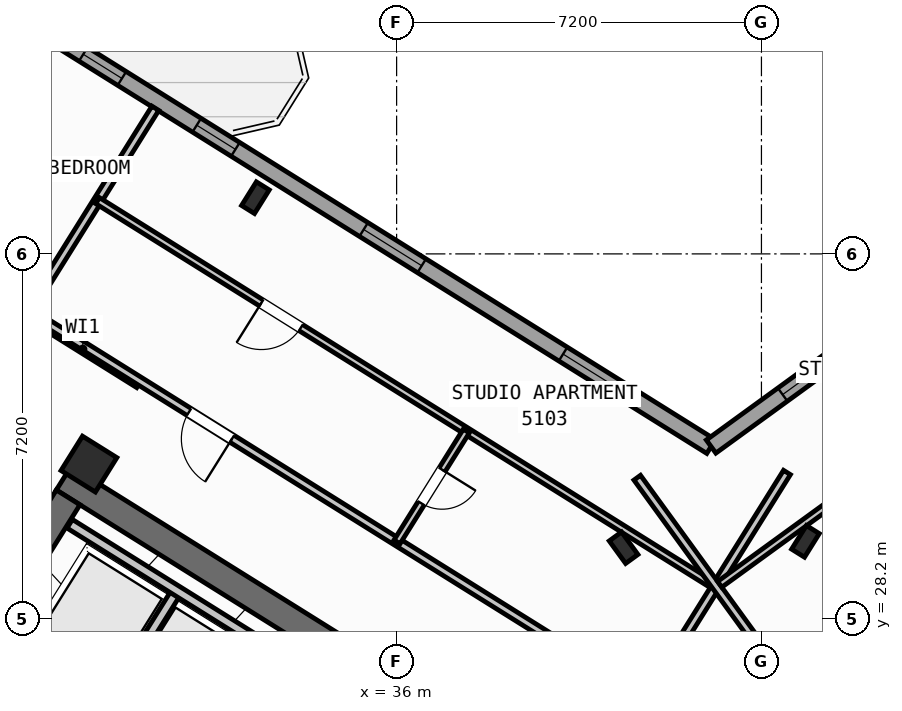
"""IFC4 building model, lengths in metres.
Left out: names, types, materials, properties, quantities, classifications, styles, units other than length and angle.
Written with IfcOpenShell. Run it as: python <this file> out.ifc"""

import sys

from ifc_helpers import new_model, si_unit, direction, frame, frame_2d, origin, origin_2d, place, context, subcontext, project, spatial, rectangle, hollow_rectangle, i_section, extrude, source, transform, mapped, element, fill, save


model = new_model("IFC4")
c1 = context("Model", 3, precision=1e-05, world=origin(), true_north=direction((0.0, 1.0)))
c2 = subcontext(c1, "Body", "Model", "MODEL_VIEW")
j1 = project(units=[si_unit("LENGTHUNIT", "METRE"), si_unit("PLANEANGLEUNIT", "RADIAN")], contexts=[c1])
p1 = place(None, origin())
s1 = spatial("IfcSite", under=j1, at=p1, CompositionType="ELEMENT")
p2 = place(p1, origin())
s2 = spatial("IfcBuilding", under=s1, at=p2, CompositionType="ELEMENT")
p3 = place(p2, frame((0.0, 0.0, 204.0)))
s3 = spatial("IfcBuildingStorey", under=s2, at=p3, CompositionType="ELEMENT", Elevation=204.0)
p4 = place(p3, frame((40.573, 24.01, 0.0), z_axis=(0.0, 0.0, 1.0), x_axis=(-0.848047359947, 0.529920442413, 0.0)))
e1 = element("IfcWall", 1, at=p4, inside=s3, PredefinedType="SHEAR", context=c2, shape_type="SweptSolid", body=[
    extrude(rectangle(XDim=13.14, YDim=0.55, at=frame_2d((6.57, 0.0))), origin(), (0.0, 0.0, 1.0), 3.35),
])
p5 = place(p3, frame((29.517, 30.594, 0.0), z_axis=(0.0, 0.0, 1.0), x_axis=(-0.529906864564, -0.848055844204, 0.0)))
e2 = element("IfcWall", 2, at=p5, inside=s3, PredefinedType="SHEAR", context=c2, shape_type="SweptSolid", body=[
    extrude(rectangle(XDim=3.575, YDim=0.55, at=frame_2d((1.788, 0.0))), origin(), (0.0, 0.0, 1.0), 3.35),
])
p6 = place(p3, frame((44.365, 24.142, 0.0), z_axis=(0.0, 0.0, 1.0), x_axis=(0.809024304885, 0.587775190107, 0.0)))
e3 = element("IfcWall", 3, at=p6, inside=s3, PredefinedType="SHEAR", context=c2, shape_type="SweptSolid", body=[
    extrude(rectangle(XDim=12.34, YDim=0.55, at=frame_2d((6.17, 0.0))), origin(), (0.0, 0.0, 1.0), 3.35),
])
m1 = source(origin(), c2, "Body", "SweptSolid", [
    extrude(i_section(OverallWidth=0.3, OverallDepth=0.55, WebThickness=0.015, FlangeThickness=0.029, at=origin_2d()), origin(), (0.0, 0.0, 1.0), 3.6),
])
for number, where, z_axis, x_axis in (
    (4, (44.068, 29.726, 0.0), (0.0, 0.0, 1.0), (-0.848, 0.53, 0.0)),
    (5, (33.213, 36.509, 0.0), (0.0, 0.0, 1.0), (-0.848, 0.53, 0.0)),
):
    element("IfcColumn", number, at=place(p3, frame(where, z_axis=z_axis, x_axis=x_axis)), inside=s3, PredefinedType="COLUMN", context=c2, shape_type="MappedRepresentation", body=[
        mapped(m1, transform((0.0, 0.0, 0.0), scale=1.0)),
    ])
m2 = source(origin(), c2, "Body", "SweptSolid", [
    extrude(hollow_rectangle(XDim=0.8, YDim=0.8, WallThickness=0.032, at=origin_2d()), origin(), (0.0, 0.0, 1.0), 3.6),
])
p7 = place(p3, frame((29.928, 31.251, 0.0), z_axis=(0.0, 0.0, 1.0), x_axis=(-0.848048096156, 0.529919264233, 0.0)))
e6 = element("IfcColumn", 6, at=p7, inside=s3, PredefinedType="COLUMN", context=c2, shape_type="MappedRepresentation", body=[
    mapped(m2, transform((0.0, 0.0, 0.0), scale=1.0)),
])
p8 = place(p3, frame((40.479, 29.601, 0.0), z_axis=(0.0, 0.0, 1.0), x_axis=(0.809016994375, 0.587785252292, 0.0)))
e7 = element("IfcColumn", 7, at=p8, inside=s3, PredefinedType="COLUMN", context=c2, shape_type="MappedRepresentation", body=[
    mapped(m1, transform((0.0, 0.0, 0.0), scale=1.0)),
])
p9 = place(p3, frame((31.76, 12.183, 0.0), z_axis=(0.0, 0.0, 1.0), x_axis=(-0.848047074256, 0.529920899612, 0.0)))
e8 = element("IfcWall", 8, at=p9, inside=s3, PredefinedType="STANDARD", context=c2, shape_type="SweptSolid", body=[
    extrude(rectangle(XDim=30.652, YDim=0.32, at=frame_2d((15.326, 0.0))), origin(), (0.0, 0.0, 1.0), 3.35),
])
p10 = place(p9, frame((15.166, 0.0, 0.0)))
e9 = element("IfcOpeningElement", 9, at=p10, cuts=e8, PredefinedType="OPENING", context=c2, shape_type="SweptSolid", body=[
    extrude(rectangle(XDim=1.2, YDim=2.15, at=frame_2d((0.6, 1.075))), frame((0.0, 0.17, 0.0), z_axis=(0.0, -1.0, 0.0), x_axis=(1.0, 0.0, 0.0)), (0.0, 0.0, 1.0), 0.34),
])
p11 = place(p9, frame((2.24, 0.0, 0.9)))
e10 = element("IfcOpeningElement", 10, at=p11, cuts=e8, PredefinedType="OPENING", context=c2, shape_type="SweptSolid", body=[
    extrude(rectangle(XDim=1.65, YDim=1.45, at=frame_2d((0.825, 0.725))), frame((0.0, 0.17, 0.0), z_axis=(0.0, -1.0, 0.0), x_axis=(1.0, 0.0, 0.0)), (0.0, 0.0, 1.0), 0.34),
])
p12 = place(p9, frame((7.469, 0.0, 0.9)))
e11 = element("IfcOpeningElement", 11, at=p12, cuts=e8, PredefinedType="OPENING", context=c2, shape_type="SweptSolid", body=[
    extrude(rectangle(XDim=1.65, YDim=1.45, at=frame_2d((0.825, 0.725))), frame((0.0, 0.17, 0.0), z_axis=(0.0, -1.0, 0.0), x_axis=(1.0, 0.0, 0.0)), (0.0, 0.0, 1.0), 0.34),
])
p13 = place(p9, frame((12.623, 0.0, 1.0)))
e12 = element("IfcOpeningElement", 12, at=p13, cuts=e8, PredefinedType="OPENING", context=c2, shape_type="SweptSolid", body=[
    extrude(rectangle(XDim=0.9, YDim=1.25, at=frame_2d((0.45, 0.625))), frame((0.0, 0.17, 0.0), z_axis=(0.0, -1.0, 0.0), x_axis=(1.0, 0.0, 0.0)), (0.0, 0.0, 1.0), 0.34),
])
p14 = place(p9, frame((19.556, 0.0, 1.0)))
e13 = element("IfcOpeningElement", 13, at=p14, cuts=e8, PredefinedType="OPENING", context=c2, shape_type="SweptSolid", body=[
    extrude(rectangle(XDim=0.9, YDim=1.25, at=frame_2d((0.45, 0.625))), frame((0.0, 0.17, 0.0), z_axis=(0.0, -1.0, 0.0), x_axis=(1.0, 0.0, 0.0)), (0.0, 0.0, 1.0), 0.34),
])
p15 = place(p9, frame((21.95, 0.0, 1.0)))
e14 = element("IfcOpeningElement", 14, at=p15, cuts=e8, PredefinedType="OPENING", context=c2, shape_type="SweptSolid", body=[
    extrude(rectangle(XDim=0.9, YDim=1.25, at=frame_2d((0.45, 0.625))), frame((0.0, 0.17, 0.0), z_axis=(0.0, -1.0, 0.0), x_axis=(1.0, 0.0, 0.0)), (0.0, 0.0, 1.0), 0.34),
])
p16 = place(p9, frame((26.983, 0.0, 0.9)))
e15 = element("IfcOpeningElement", 15, at=p16, cuts=e8, PredefinedType="OPENING", context=c2, shape_type="SweptSolid", body=[
    extrude(rectangle(XDim=1.35, YDim=1.45, at=frame_2d((0.675, 0.725))), frame((0.0, 0.17, 0.0), z_axis=(0.0, -1.0, 0.0), x_axis=(1.0, 0.0, 0.0)), (0.0, 0.0, 1.0), 0.34),
])
p17 = place(p3, frame((17.424, 47.083, 0.0), z_axis=(0.0, 0.0, 1.0), x_axis=(0.848049927979, -0.529916332693, 0.0)))
e16 = element("IfcWall", 16, at=p17, inside=s3, PredefinedType="STANDARD", context=c2, shape_type="SweptSolid", body=[
    extrude(rectangle(XDim=29.223, YDim=0.32, at=frame_2d((14.612, 0.0))), origin(), (0.0, 0.0, 1.0), 3.35),
])
p18 = place(p17, frame((8.799, 0.0, 0.0)))
e17 = element("IfcOpeningElement", 17, at=p18, cuts=e16, PredefinedType="OPENING", context=c2, shape_type="SweptSolid", body=[
    extrude(rectangle(XDim=1.05, YDim=2.15, at=frame_2d((0.525, 1.075))), frame((0.0, 0.17, 0.0), z_axis=(0.0, -1.0, 0.0), x_axis=(1.0, 0.0, 0.0)), (0.0, 0.0, 1.0), 0.34),
])
p19 = place(p17, frame((0.794, 0.0, 0.9)))
e18 = element("IfcOpeningElement", 18, at=p19, cuts=e16, PredefinedType="OPENING", context=c2, shape_type="SweptSolid", body=[
    extrude(rectangle(XDim=1.65, YDim=1.45, at=frame_2d((0.825, 0.725))), frame((0.0, 0.17, 0.0), z_axis=(0.0, -1.0, 0.0), x_axis=(1.0, 0.0, 0.0)), (0.0, 0.0, 1.0), 0.34),
])
p20 = place(p17, frame((4.056, 0.0, 0.9)))
e19 = element("IfcOpeningElement", 19, at=p20, cuts=e16, PredefinedType="OPENING", context=c2, shape_type="SweptSolid", body=[
    extrude(rectangle(XDim=1.35, YDim=1.45, at=frame_2d((0.675, 0.725))), frame((0.0, 0.17, 0.0), z_axis=(0.0, -1.0, 0.0), x_axis=(1.0, 0.0, 0.0)), (0.0, 0.0, 1.0), 0.34),
])
p21 = place(p17, frame((7.151, 0.0, 1.0)))
e20 = element("IfcOpeningElement", 20, at=p21, cuts=e16, PredefinedType="OPENING", context=c2, shape_type="SweptSolid", body=[
    extrude(rectangle(XDim=0.9, YDim=1.25, at=frame_2d((0.45, 0.625))), frame((0.0, 0.17, 0.0), z_axis=(0.0, -1.0, 0.0), x_axis=(1.0, 0.0, 0.0)), (0.0, 0.0, 1.0), 0.34),
])
p22 = place(p17, frame((14.612, 0.0, 1.0)))
e21 = element("IfcOpeningElement", 21, at=p22, cuts=e16, PredefinedType="OPENING", context=c2, shape_type="SweptSolid", body=[
    extrude(rectangle(XDim=0.9, YDim=1.25, at=frame_2d((0.45, 0.625))), frame((0.0, 0.17, 0.0), z_axis=(0.0, -1.0, 0.0), x_axis=(1.0, 0.0, 0.0)), (0.0, 0.0, 1.0), 0.34),
])
p23 = place(p17, frame((17.254, 0.0, 1.0)))
e22 = element("IfcOpeningElement", 22, at=p23, cuts=e16, PredefinedType="OPENING", context=c2, shape_type="SweptSolid", body=[
    extrude(rectangle(XDim=0.9, YDim=1.25, at=frame_2d((0.45, 0.625))), frame((0.0, 0.17, 0.0), z_axis=(0.0, -1.0, 0.0), x_axis=(1.0, 0.0, 0.0)), (0.0, 0.0, 1.0), 0.34),
])
p24 = place(p17, frame((21.139, 0.0, 0.9)))
e23 = element("IfcOpeningElement", 23, at=p24, cuts=e16, PredefinedType="OPENING", context=c2, shape_type="SweptSolid", body=[
    extrude(rectangle(XDim=1.35, YDim=1.45, at=frame_2d((0.675, 0.725))), frame((0.0, 0.17, 0.0), z_axis=(0.0, -1.0, 0.0), x_axis=(1.0, 0.0, 0.0)), (0.0, 0.0, 1.0), 0.34),
])
p25 = place(p17, frame((25.778, 0.0, 0.9)))
e24 = element("IfcOpeningElement", 24, at=p25, cuts=e16, PredefinedType="OPENING", context=c2, shape_type="SweptSolid", body=[
    extrude(rectangle(XDim=1.35, YDim=1.45, at=frame_2d((0.675, 0.725))), frame((0.0, 0.17, 0.0), z_axis=(0.0, -1.0, 0.0), x_axis=(1.0, 0.0, 0.0)), (0.0, 0.0, 1.0), 0.34),
])
p26 = place(p3, frame((42.207, 31.597, 0.0), z_axis=(0.0, 0.0, 1.0), x_axis=(0.809020333377, 0.587780656523, 0.0)))
e25 = element("IfcWall", 25, at=p26, inside=s3, PredefinedType="STANDARD", context=c2, shape_type="SweptSolid", body=[
    extrude(rectangle(XDim=15.223, YDim=0.32, at=frame_2d((7.611, 0.0))), origin(), (0.0, 0.0, 1.0), 3.35),
])
p27 = place(p26, frame((12.82, 0.0, 0.0)))
e26 = element("IfcOpeningElement", 26, at=p27, cuts=e25, PredefinedType="OPENING", context=c2, shape_type="SweptSolid", body=[
    extrude(rectangle(XDim=1.05, YDim=2.15, at=frame_2d((0.525, 1.075))), frame((0.0, 0.17, 0.0), z_axis=(0.0, -1.0, 0.0), x_axis=(1.0, 0.0, 0.0)), (0.0, 0.0, 1.0), 0.34),
])
p28 = place(p26, frame((1.745, 0.0, 0.9)))
e27 = element("IfcOpeningElement", 27, at=p28, cuts=e25, PredefinedType="OPENING", context=c2, shape_type="SweptSolid", body=[
    extrude(rectangle(XDim=1.65, YDim=1.45, at=frame_2d((0.825, 0.725))), frame((0.0, 0.17, 0.0), z_axis=(0.0, -1.0, 0.0), x_axis=(1.0, 0.0, 0.0)), (0.0, 0.0, 1.0), 0.34),
])
p29 = place(p26, frame((5.985, 0.0, 0.9)))
e28 = element("IfcOpeningElement", 28, at=p29, cuts=e25, PredefinedType="OPENING", context=c2, shape_type="SweptSolid", body=[
    extrude(rectangle(XDim=1.65, YDim=1.45, at=frame_2d((0.825, 0.725))), frame((0.0, 0.17, 0.0), z_axis=(0.0, -1.0, 0.0), x_axis=(1.0, 0.0, 0.0)), (0.0, 0.0, 1.0), 0.34),
])
p30 = place(p26, frame((10.219, 0.0, 1.0)))
e29 = element("IfcOpeningElement", 29, at=p30, cuts=e25, PredefinedType="OPENING", context=c2, shape_type="SweptSolid", body=[
    extrude(rectangle(XDim=0.9, YDim=1.25, at=frame_2d((0.45, 0.625))), frame((0.0, 0.17, 0.0), z_axis=(0.0, -1.0, 0.0), x_axis=(1.0, 0.0, 0.0)), (0.0, 0.0, 1.0), 0.34),
])
p31 = place(p3, frame((31.645, 28.716, 0.0), z_axis=(0.0, 0.0, 1.0), x_axis=(-0.52986693015, -0.848080795876, 0.0)))
e30 = element("IfcWall", 30, at=p31, inside=s3, PredefinedType="STANDARD", context=c2, shape_type="SweptSolid", body=[
    extrude(rectangle(XDim=2.66, YDim=0.2, at=frame_2d((1.33, 0.0))), origin(), (0.0, 0.0, 1.0), 3.34),
])
p32 = place(p3, frame((33.363, 27.69, 0.0), z_axis=(0.0, 0.0, 1.0), x_axis=(-0.848047090064, 0.529920874315, 0.0)))
e31 = element("IfcWall", 31, at=p32, inside=s3, PredefinedType="STANDARD", context=c2, shape_type="SweptSolid", body=[
    extrude(rectangle(XDim=4.498, YDim=0.2, at=frame_2d((2.249, 0.0))), origin(), (0.0, 0.0, 1.0), 3.34),
])
p33 = place(p3, frame((30.914, 32.829, 0.0), z_axis=(0.0, 0.0, 1.0), x_axis=(-0.848008813643, 0.529982124211, 0.0)))
e32 = element("IfcWall", 32, at=p33, inside=s3, PredefinedType="PARTITIONING", context=c2, shape_type="SweptSolid", body=[
    extrude(rectangle(XDim=2.61, YDim=0.16, at=frame_2d((1.305, 0.0))), origin(), (0.0, 0.0, 1.0), 3.34),
])
p34 = place(p3, frame((31.239, 38.274, 0.0), z_axis=(0.0, 0.0, 1.0), x_axis=(-0.529918119251, -0.84804881162, 0.0)))
e33 = element("IfcWall", 33, at=p34, inside=s3, PredefinedType="PARTITIONING", context=c2, shape_type="SweptSolid", body=[
    extrude(rectangle(XDim=17.65, YDim=0.16, at=frame_2d((8.825, 0.0))), origin(), (0.0, 0.0, 1.0), 3.34),
])
p35 = place(p3, frame((29.161, 39.89, 0.0), z_axis=(0.0, 0.0, 1.0), x_axis=(-0.529915512424, -0.848050440535, 0.0)))
e34 = element("IfcWall", 34, at=p35, inside=s3, PredefinedType="PARTITIONING", context=c2, shape_type="SweptSolid", body=[
    extrude(rectangle(XDim=15.52, YDim=0.11, at=frame_2d((7.76, 0.0))), origin(), (0.0, 0.0, 1.0), 3.34),
])
p36 = place(p35, frame((7.345, 0.0, 0.0)))
e35 = element("IfcOpeningElement", 35, at=p36, cuts=e34, PredefinedType="OPENING", context=c2, shape_type="SweptSolid", body=[
    extrude(rectangle(XDim=0.92, YDim=2.08, at=frame_2d((0.46, 1.04))), frame((0.0, 0.065, 0.0), z_axis=(0.0, -1.0, 0.0), x_axis=(1.0, 0.0, 0.0)), (0.0, 0.0, 1.0), 0.13),
])
p37 = place(p3, frame((41.936, 26.012, 0.0), z_axis=(0.0, 0.0, 1.0), x_axis=(-0.848051154596, 0.529914369676, 0.0)))
e36 = element("IfcWall", 36, at=p37, inside=s3, PredefinedType="PARTITIONING", context=c2, shape_type="SweptSolid", body=[
    extrude(rectangle(XDim=15.57, YDim=0.16, at=frame_2d((7.785, 0.0))), origin(), (0.0, 0.0, 1.0), 3.34),
])
p38 = place(p37, frame((10.83, 0.0, 0.0)))
e37 = element("IfcOpeningElement", 37, at=p38, cuts=e36, PredefinedType="OPENING", context=c2, shape_type="SweptSolid", body=[
    extrude(rectangle(XDim=1.0, YDim=2.1, at=frame_2d((0.5, 1.05))), frame((0.0, 0.09, 0.0), z_axis=(0.0, -1.0, 0.0), x_axis=(1.0, 0.0, 0.0)), (0.0, 0.0, 1.0), 0.18),
])
p39 = place(p3, frame((43.704, 31.086, 0.0), z_axis=(0.0, 0.0, 1.0), x_axis=(-0.529906828443, -0.848055866774, 0.0)))
e38 = element("IfcWall", 38, at=p39, inside=s3, PredefinedType="PARTITIONING", context=c2, shape_type="SweptSolid", body=[
    extrude(rectangle(XDim=5.48, YDim=0.16, at=frame_2d((2.74, 0.0))), origin(), (0.0, 0.0, 1.0), 3.34),
])
p40 = place(p3, frame((42.226, 28.873, 0.0), z_axis=(0.0, 0.0, 1.0), x_axis=(-0.848049134363, 0.529917602752, 0.0)))
e39 = element("IfcWall", 39, at=p40, inside=s3, PredefinedType="PLUMBINGWALL", context=c2, shape_type="SweptSolid", body=[
    extrude(rectangle(XDim=14.3, YDim=0.14, at=frame_2d((7.15, 0.0))), origin(), (0.0, 0.0, 1.0), 3.34),
])
p41 = place(p40, frame((9.57, 0.0, 0.0)))
e40 = element("IfcOpeningElement", 40, at=p41, cuts=e39, PredefinedType="OPENING", context=c2, shape_type="SweptSolid", body=[
    extrude(rectangle(XDim=0.92, YDim=2.08, at=frame_2d((0.46, 1.04))), frame((0.0, 0.08, 0.0), z_axis=(0.0, -1.0, 0.0), x_axis=(1.0, 0.0, 0.0)), (0.0, 0.0, 1.0), 0.16),
])
p42 = place(p3, frame((37.375, 31.904, 0.0), z_axis=(0.0, 0.0, 1.0), x_axis=(-0.529913878929, -0.848051461244, 0.0)))
e41 = element("IfcWall", 41, at=p42, inside=s3, PredefinedType="PLUMBINGWALL", context=c2, shape_type="SweptSolid", body=[
    extrude(rectangle(XDim=2.58, YDim=0.14, at=frame_2d((1.29, 0.0))), origin(), (0.0, 0.0, 1.0), 3.34),
])
p43 = place(p42, frame((0.9, 0.0, 0.0)))
e42 = element("IfcOpeningElement", 42, at=p43, cuts=e41, PredefinedType="OPENING", context=c2, shape_type="SweptSolid", body=[
    extrude(rectangle(XDim=0.78, YDim=2.05, at=frame_2d((0.39, 1.025))), frame((0.0, 0.08, 0.0), z_axis=(0.0, -1.0, 0.0), x_axis=(1.0, 0.0, 0.0)), (0.0, 0.0, 1.0), 0.16),
])
p44 = place(p3, frame((42.866, 26.044, 0.0), z_axis=(0.0, 0.0, 1.0), x_axis=(0.809020254154, 0.587780765566, 0.0)))
e43 = element("IfcWall", 43, at=p44, inside=s3, PredefinedType="PARTITIONING", context=c2, shape_type="SweptSolid", body=[
    extrude(rectangle(XDim=14.67, YDim=0.16, at=frame_2d((7.335, 0.0))), origin(), (0.0, 0.0, 1.0), 3.34),
])
p45 = place(p44, frame((10.2, 0.0, 0.0)))
e44 = element("IfcOpeningElement", 44, at=p45, cuts=e43, PredefinedType="OPENING", context=c2, shape_type="SweptSolid", body=[
    extrude(rectangle(XDim=1.0, YDim=2.1, at=frame_2d((0.5, 1.05))), frame((0.0, 0.09, 0.0), z_axis=(0.0, -1.0, 0.0), x_axis=(1.0, 0.0, 0.0)), (0.0, 0.0, 1.0), 0.18),
])
p46 = place(p3, frame((43.969, 26.55, 0.0), z_axis=(0.0, 0.0, 1.0), x_axis=(-0.587776919386, 0.80902304852, 0.0)))
e45 = element("IfcWall", 45, at=p46, inside=s3, PredefinedType="PARTITIONING", context=c2, shape_type="SweptSolid", body=[
    extrude(rectangle(XDim=5.48, YDim=0.16, at=frame_2d((2.74, 0.0))), origin(), (0.0, 0.0, 1.0), 3.34),
])
p47 = place(p3, frame((42.377, 28.878, 0.0), z_axis=(0.0, 0.0, 1.0), x_axis=(0.809020411523, 0.587780548963, 0.0)))
e46 = element("IfcWall", 46, at=p47, inside=s3, PredefinedType="PLUMBINGWALL", context=c2, shape_type="SweptSolid", body=[
    extrude(rectangle(XDim=13.4, YDim=0.14, at=frame_2d((6.7, 0.0))), origin(), (0.0, 0.0, 1.0), 3.34),
])
p48 = place(p47, frame((8.94, 0.0, 0.0)))
e47 = element("IfcOpeningElement", 47, at=p48, cuts=e46, PredefinedType="OPENING", context=c2, shape_type="SweptSolid", body=[
    extrude(rectangle(XDim=0.92, YDim=2.08, at=frame_2d((0.46, 1.04))), frame((0.0, 0.08, 0.0), z_axis=(0.0, -1.0, 0.0), x_axis=(1.0, 0.0, 0.0)), (0.0, 0.0, 1.0), 0.16),
])
m3 = source(origin(), c2, "Body", "SweptSolid", [
    extrude(rectangle(XDim=0.9, YDim=1.25, at=frame_2d((0.45, 0.625))), frame((0.0, 0.03, 0.0), z_axis=(0.0, -1.0, 0.0), x_axis=(1.0, 0.0, 0.0)), (0.0, 0.0, 1.0), 0.06),
])
p49 = place(p22, origin())
e48 = element("IfcWindow", 48, at=p49, inside=s3, PartitioningType="SINGLE_PANEL", PredefinedType="WINDOW", context=c2, shape_type="MappedRepresentation", body=[
    mapped(m3, transform((0.0, 0.0, 0.0), scale=1.0)),
])
fill(e21, e48)
p50 = place(p23, origin())
e49 = element("IfcWindow", 49, at=p50, inside=s3, PartitioningType="SINGLE_PANEL", PredefinedType="WINDOW", context=c2, shape_type="MappedRepresentation", body=[
    mapped(m3, transform((0.0, 0.0, 0.0), scale=1.0)),
])
fill(e22, e49)
m4 = source(origin(), c2, "Body", "SweptSolid", [
    extrude(rectangle(XDim=1.35, YDim=1.45, at=frame_2d((0.675, 0.725))), frame((0.0, 0.03, 0.0), z_axis=(0.0, -1.0, 0.0), x_axis=(1.0, 0.0, 0.0)), (0.0, 0.0, 1.0), 0.06),
])
p51 = place(p24, origin())
e50 = element("IfcWindow", 50, at=p51, inside=s3, PartitioningType="SINGLE_PANEL", PredefinedType="WINDOW", context=c2, shape_type="MappedRepresentation", body=[
    mapped(m4, transform((0.0, 0.0, 0.0), scale=1.0)),
])
fill(e23, e50)
p52 = place(p25, origin())
e51 = element("IfcWindow", 51, at=p52, inside=s3, PartitioningType="SINGLE_PANEL", PredefinedType="WINDOW", context=c2, shape_type="MappedRepresentation", body=[
    mapped(m4, transform((0.0, 0.0, 0.0), scale=1.0)),
])
fill(e24, e51)
m5 = source(origin(), c2, "Body", "SweptSolid", [
    extrude(rectangle(XDim=1.65, YDim=1.45, at=frame_2d((0.825, 0.725))), frame((0.0, 0.03, 0.0), z_axis=(0.0, -1.0, 0.0), x_axis=(1.0, 0.0, 0.0)), (0.0, 0.0, 1.0), 0.06),
])
p53 = place(p28, origin())
e52 = element("IfcWindow", 52, at=p53, inside=s3, PartitioningType="SINGLE_PANEL", PredefinedType="WINDOW", context=c2, shape_type="MappedRepresentation", body=[
    mapped(m5, transform((0.0, 0.0, 0.0), scale=1.0)),
])
fill(e27, e52)
m6 = source(origin(), c2, "Body", "SweptSolid", [
    extrude(rectangle(XDim=1.0, YDim=2.1, at=frame_2d((0.5, 1.05))), frame((0.0, 0.025, 0.0), z_axis=(0.0, -1.0, 0.0), x_axis=(1.0, 0.0, 0.0)), (0.0, 0.0, 1.0), 0.05),
])
p54 = place(p38, origin())
e53 = element("IfcDoor", 53, at=p54, inside=s3, OperationType="SINGLE_SWING_LEFT", PredefinedType="DOOR", context=c2, shape_type="MappedRepresentation", body=[
    mapped(m6, transform((0.0, 0.0, 0.0), scale=1.0)),
])
fill(e37, e53)
m7 = source(origin(), c2, "Body", "SweptSolid", [
    extrude(rectangle(XDim=0.92, YDim=2.08, at=frame_2d((0.46, 1.04))), frame((0.0, 0.025, 0.0), z_axis=(0.0, -1.0, 0.0), x_axis=(1.0, 0.0, 0.0)), (0.0, 0.0, 1.0), 0.05),
])
p55 = place(p41, origin())
e54 = element("IfcDoor", 54, at=p55, inside=s3, OperationType="SINGLE_SWING_RIGHT", PredefinedType="DOOR", context=c2, shape_type="MappedRepresentation", body=[
    mapped(m7, transform((0.0, 0.0, 0.0), scale=1.0)),
])
fill(e40, e54)
m8 = source(origin(), c2, "Body", "SweptSolid", [
    extrude(rectangle(XDim=0.78, YDim=2.05, at=frame_2d((0.39, 1.025))), frame((0.0, 0.025, 0.0), z_axis=(0.0, -1.0, 0.0), x_axis=(1.0, 0.0, 0.0)), (0.0, 0.0, 1.0), 0.05),
])
p56 = place(p43, origin())
e55 = element("IfcDoor", 55, at=p56, inside=s3, OperationType="SINGLE_SWING_LEFT", PredefinedType="DOOR", context=c2, shape_type="MappedRepresentation", body=[
    mapped(m8, transform((0.0, 0.0, 0.0), scale=1.0)),
])
fill(e42, e55)
save(model, sys.argv[1])
